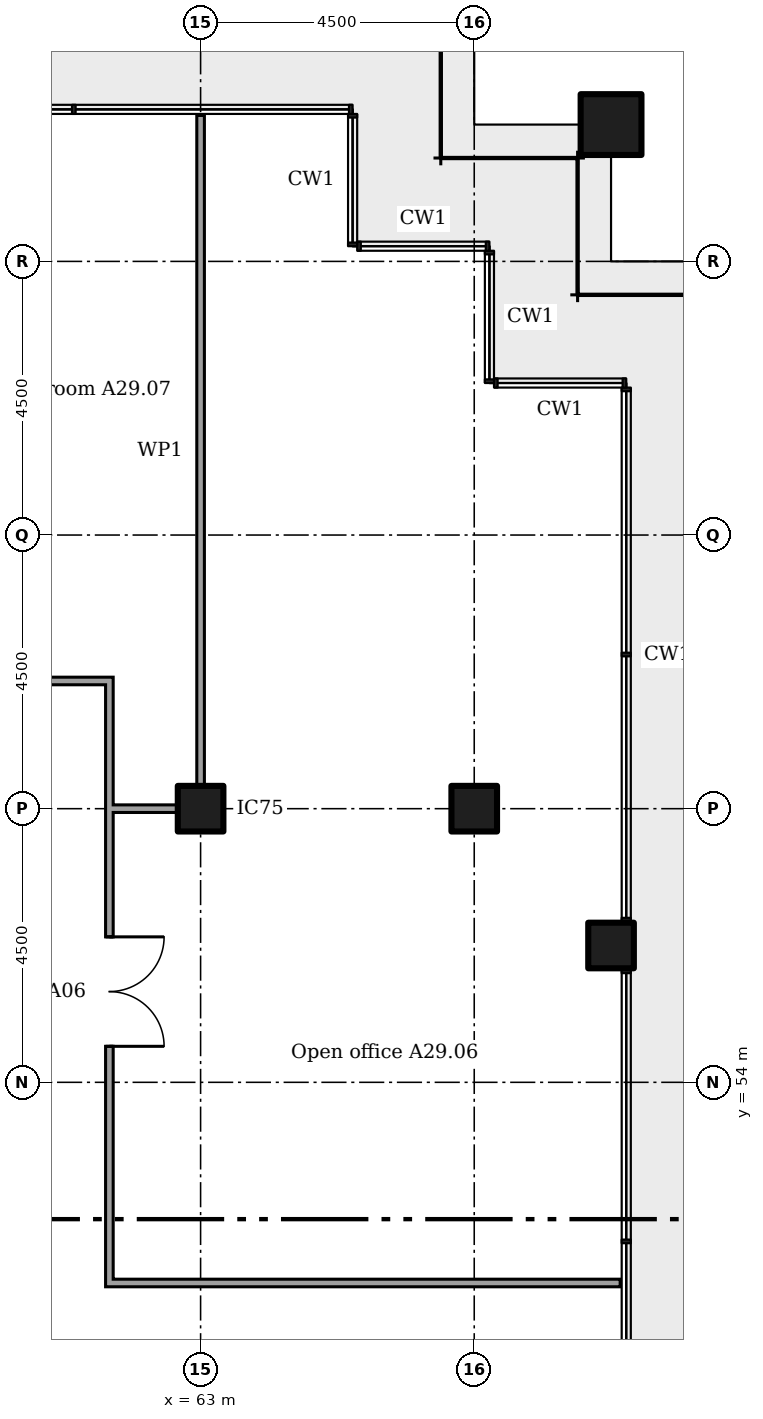
"""IFC4 building model, lengths in metres.
Left out: names, types, materials, properties, quantities, classifications, styles, units other than length and angle.
Written with IfcOpenShell. Run it as: python <this file> out.ifc"""

import sys

from ifc_helpers import new_model, si_unit, direction, frame, frame_2d, origin, origin_2d, place, context, subcontext, project, spatial, rectangle, extrude, element, fill, save


model = new_model("IFC4")
c1 = context("Model", 3, precision=1e-05, world=origin(), true_north=direction((0.0, 1.0)))
c2 = subcontext(c1, "Body", "Model", "MODEL_VIEW")
j1 = project(units=[si_unit("LENGTHUNIT", "METRE"), si_unit("PLANEANGLEUNIT", "RADIAN")], contexts=[c1])
p1 = place(None, origin())
s1 = spatial("IfcSite", under=j1, at=p1, CompositionType="ELEMENT")
p2 = place(p1, origin())
s2 = spatial("IfcBuilding", under=s1, at=p2, CompositionType="ELEMENT")
p3 = place(p2, frame((0.0, 0.0, 120.8)))
s3 = spatial("IfcBuildingStorey", under=s2, at=p3, CompositionType="ELEMENT", Elevation=120.8)
p4 = place(p3, frame((69.75, 69.75, 0.0)))
e1 = element("IfcColumn", 1, at=p4, inside=s3, PredefinedType="COLUMN", context=c2, shape_type="SweptSolid", body=[
    extrude(rectangle(XDim=1.0, YDim=1.0, at=origin_2d()), origin(), (0.0, 0.0, 1.0), 3.6),
])
for number, where in (
    (2, (63.0, 58.5, 0.0)),
    (3, (67.5, 58.5, 0.0)),
    (4, (69.75, 56.25, 0.0)),
):
    element("IfcColumn", number, at=place(p3, frame(where)), inside=s3, PredefinedType="COLUMN", context=c2, shape_type="SweptSolid", body=[
        extrude(rectangle(XDim=0.75, YDim=0.75, at=origin_2d()), origin(), (0.0, 0.0, 1.0), 3.6),
    ])
p5 = place(p3, frame((61.438, 50.7, 0.0)))
e5 = element("IfcWall", 5, at=p5, inside=s3, PredefinedType="PARTITIONING", context=c2, shape_type="SweptSolid", body=[
    extrude(rectangle(XDim=8.462, YDim=0.125, at=frame_2d((4.231, 0.0))), origin(), (0.0, 0.0, 1.0), 3.45),
])
p6 = place(p3, frame((61.5, 58.5, 0.0)))
e6 = element("IfcWall", 6, at=p6, inside=s3, PredefinedType="PARTITIONING", context=c2, shape_type="SweptSolid", body=[
    extrude(rectangle(XDim=1.125, YDim=0.125, at=frame_2d((0.562, 0.0))), origin(), (0.0, 0.0, 1.0), 2.676),
])
p7 = place(p3, frame((42.6, 60.6, 0.0)))
e7 = element("IfcWall", 7, at=p7, inside=s3, PredefinedType="PARTITIONING", context=c2, shape_type="SweptSolid", body=[
    extrude(rectangle(XDim=18.962, YDim=0.125, at=frame_2d((9.481, 0.0))), origin(), (0.0, 0.0, 1.0), 3.45),
])
p8 = place(p7, frame((16.9, 0.0, 0.0)))
e8 = element("IfcOpeningElement", 8, at=p8, cuts=e7, PredefinedType="OPENING", context=c2, shape_type="SweptSolid", body=[
    extrude(rectangle(XDim=1.0, YDim=2.1, at=frame_2d((0.5, 1.05))), frame((0.0, 0.073, 0.0), z_axis=(0.0, -1.0, 0.0), x_axis=(1.0, 0.0, 0.0)), (0.0, 0.0, 1.0), 0.145),
])
p9 = place(p7, frame((12.695, 0.0, 0.0)))
e9 = element("IfcOpeningElement", 9, at=p9, cuts=e7, PredefinedType="OPENING", context=c2, shape_type="SweptSolid", body=[
    extrude(rectangle(XDim=1.0, YDim=2.1, at=frame_2d((0.5, 1.05))), frame((0.0, 0.073, 0.0), z_axis=(0.0, -1.0, 0.0), x_axis=(1.0, 0.0, 0.0)), (0.0, 0.0, 1.0), 0.145),
])
p10 = place(p7, frame((9.105, 0.0, 0.0)))
e10 = element("IfcOpeningElement", 10, at=p10, cuts=e7, PredefinedType="OPENING", context=c2, shape_type="SweptSolid", body=[
    extrude(rectangle(XDim=1.0, YDim=2.1, at=frame_2d((0.5, 1.05))), frame((0.0, 0.073, 0.0), z_axis=(0.0, -1.0, 0.0), x_axis=(1.0, 0.0, 0.0)), (0.0, 0.0, 1.0), 0.145),
])
p11 = place(p7, frame((2.95, 0.0, 0.0)))
e11 = element("IfcOpeningElement", 11, at=p11, cuts=e7, PredefinedType="OPENING", context=c2, shape_type="SweptSolid", body=[
    extrude(rectangle(XDim=1.0, YDim=2.1, at=frame_2d((0.5, 1.05))), frame((0.0, 0.073, 0.0), z_axis=(0.0, -1.0, 0.0), x_axis=(1.0, 0.0, 0.0)), (0.0, 0.0, 1.0), 0.145),
])
p12 = place(p3, frame((61.5, 50.762, 0.0), z_axis=(0.0, 0.0, 1.0), x_axis=(0.0, 1.0, 0.0)))
e12 = element("IfcWall", 12, at=p12, inside=s3, PredefinedType="PARTITIONING", context=c2, shape_type="SweptSolid", body=[
    extrude(rectangle(XDim=9.775, YDim=0.125, at=frame_2d((4.888, 0.0))), origin(), (0.0, 0.0, 1.0), 3.45),
])
p13 = place(p12, frame((3.83, 0.0, 0.0)))
e13 = element("IfcOpeningElement", 13, at=p13, cuts=e12, PredefinedType="OPENING", context=c2, shape_type="SweptSolid", body=[
    extrude(rectangle(XDim=1.8, YDim=2.1, at=frame_2d((0.9, 1.05))), frame((0.0, 0.073, 0.0), z_axis=(0.0, -1.0, 0.0), x_axis=(1.0, 0.0, 0.0)), (0.0, 0.0, 1.0), 0.145),
])
p14 = place(p3, frame((63.0, 58.875, 0.0), z_axis=(0.0, 0.0, 1.0), x_axis=(0.0, 1.0, 0.0)))
e14 = element("IfcWall", 14, at=p14, inside=s3, PredefinedType="PARTITIONING", context=c2, shape_type="SweptSolid", body=[
    extrude(rectangle(XDim=11.025, YDim=0.125, at=frame_2d((5.512, 0.0))), origin(), (0.0, 0.0, 1.0), 2.766),
])
p15 = place(p13, frame((1.8, 0.0, 0.0), x_axis=(-1.0, 0.0, 0.0)))
e15 = element("IfcDoor", 15, at=p15, inside=s3, OperationType="DOUBLE_DOOR_SINGLE_SWING", PredefinedType="DOOR", context=c2, shape_type="SweptSolid", body=[
    extrude(rectangle(XDim=1.8, YDim=2.1, at=frame_2d((0.9, 1.05))), frame((0.0, 0.025, 0.0), z_axis=(0.0, -1.0, 0.0), x_axis=(1.0, 0.0, 0.0)), (0.0, 0.0, 1.0), 0.05),
])
fill(e13, e15)
save(model, sys.argv[1])
